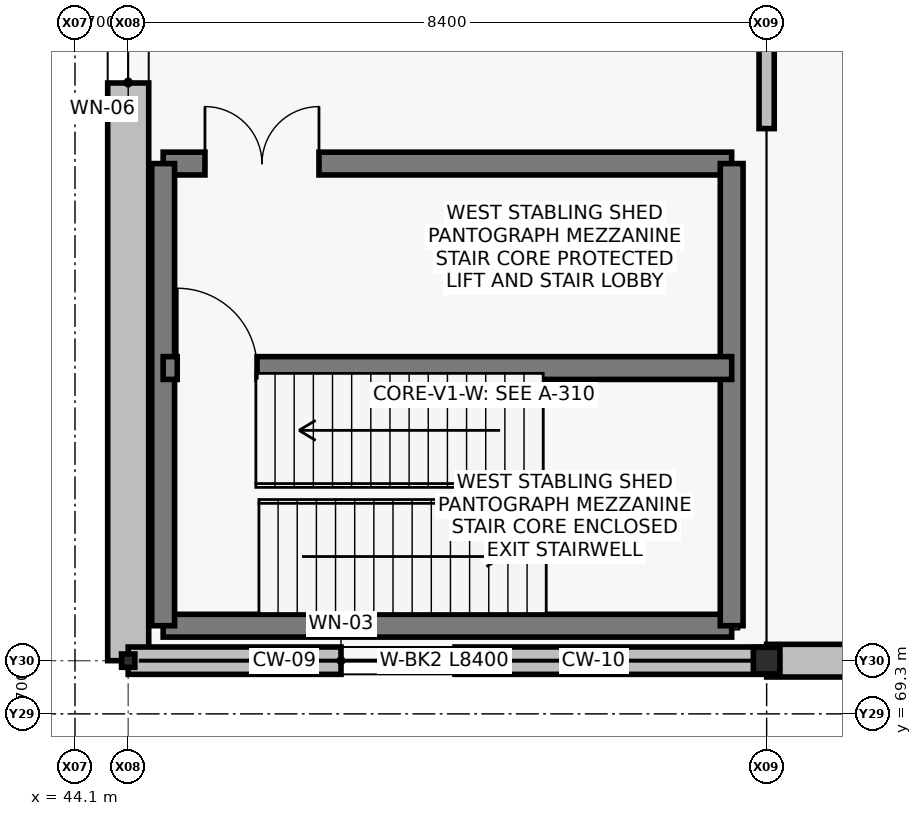
"""IFC4 building model, lengths in metres.
Left out: names, types, materials, properties, quantities, classifications, styles, units other than length and angle.
Written with IfcOpenShell. Run it as: python <this file> out.ifc"""

import sys

from ifc_helpers import new_model, si_unit, direction, frame, frame_2d, origin, origin_2d, place, context, subcontext, project, spatial, rectangle, i_section, extrude, element, fill, save


model = new_model("IFC4")
c1 = context("Model", 3, precision=1e-05, world=origin(), true_north=direction((0.0, 1.0)))
c2 = subcontext(c1, "Body", "Model", "MODEL_VIEW")
j1 = project(units=[si_unit("LENGTHUNIT", "METRE"), si_unit("PLANEANGLEUNIT", "RADIAN")], contexts=[c1])
p1 = place(None, origin())
s1 = spatial("IfcSite", under=j1, at=p1, CompositionType="ELEMENT")
p2 = place(p1, origin())
s2 = spatial("IfcBuilding", under=s1, at=p2, CompositionType="ELEMENT")
p3 = place(p2, origin())
s3 = spatial("IfcBuildingStorey", under=s2, at=p3, CompositionType="ELEMENT", Elevation=0.0)
p4 = place(p3, frame((44.8, 70.0, -0.35), z_axis=(0.0, 0.0, 1.0), x_axis=(1.0, 0.0, 0.0)))
e1 = element("IfcColumn", 1, at=p4, inside=s3, PredefinedType="COLUMN", context=c2, shape_type="SweptSolid", body=[
    extrude(i_section(OverallWidth=0.175, OverallDepth=0.175, WebThickness=0.007, FlangeThickness=0.011, at=origin_2d()), origin(), (0.0, 0.0, 1.0), 6.35),
])
p5 = place(p3, frame((53.2, 70.0, -0.35), z_axis=(0.0, 0.0, 1.0), x_axis=(1.0, 0.0, 0.0)))
e2 = element("IfcColumn", 2, at=p5, inside=s3, PredefinedType="COLUMN", context=c2, shape_type="SweptSolid", body=[
    extrude(i_section(OverallWidth=0.35, OverallDepth=0.35, WebThickness=0.012, FlangeThickness=0.019, at=origin_2d()), origin(), (0.0, 0.0, 1.0), 6.35),
])
p6 = place(p3, frame((44.8, 70.0, 0.0), z_axis=(0.0, 0.0, 1.0), x_axis=(0.0, 1.0, 0.0)))
e3 = element("IfcWall", 3, at=p6, inside=s3, PredefinedType="SOLIDWALL", context=c2, shape_type="SweptSolid", body=[
    extrude(rectangle(XDim=30.0, YDim=0.54, at=frame_2d((15.0, 0.0))), origin(), (0.0, 0.0, 1.0), 5.14),
])
p7 = place(p6, frame((7.6, 0.0, 1.1)))
e4 = element("IfcOpeningElement", 4, at=p7, cuts=e3, PredefinedType="OPENING", context=c2, shape_type="SweptSolid", body=[
    extrude(rectangle(XDim=1.8, YDim=2.1, at=frame_2d((0.9, 1.05))), frame((0.0, 0.28, 0.0), z_axis=(0.0, -1.0, 0.0), x_axis=(1.0, 0.0, 0.0)), (0.0, 0.0, 1.0), 0.56),
])
p8 = place(p6, frame((11.2, 0.0, 0.0)))
e5 = element("IfcOpeningElement", 5, at=p8, cuts=e3, PredefinedType="OPENING", context=c2, shape_type="SweptSolid", body=[
    extrude(rectangle(XDim=3.8, YDim=4.4, at=frame_2d((1.9, 2.2))), frame((0.0, 0.28, 0.0), z_axis=(0.0, -1.0, 0.0), x_axis=(1.0, 0.0, 0.0)), (0.0, 0.0, 1.0), 0.56),
])
p9 = place(p6, frame((15.4, 0.0, 0.0)))
e6 = element("IfcOpeningElement", 6, at=p9, cuts=e3, PredefinedType="OPENING", context=c2, shape_type="SweptSolid", body=[
    extrude(rectangle(XDim=3.8, YDim=4.4, at=frame_2d((1.9, 2.2))), frame((0.0, 0.28, 0.0), z_axis=(0.0, -1.0, 0.0), x_axis=(1.0, 0.0, 0.0)), (0.0, 0.0, 1.0), 0.56),
])
p10 = place(p6, frame((21.2, 0.0, 0.0)))
e7 = element("IfcOpeningElement", 7, at=p10, cuts=e3, PredefinedType="OPENING", context=c2, shape_type="SweptSolid", body=[
    extrude(rectangle(XDim=3.8, YDim=4.4, at=frame_2d((1.9, 2.2))), frame((0.0, 0.28, 0.0), z_axis=(0.0, -1.0, 0.0), x_axis=(1.0, 0.0, 0.0)), (0.0, 0.0, 1.0), 0.56),
])
p11 = place(p6, frame((25.4, 0.0, 0.0)))
e8 = element("IfcOpeningElement", 8, at=p11, cuts=e3, PredefinedType="OPENING", context=c2, shape_type="SweptSolid", body=[
    extrude(rectangle(XDim=3.8, YDim=4.4, at=frame_2d((1.9, 2.2))), frame((0.0, 0.28, 0.0), z_axis=(0.0, -1.0, 0.0), x_axis=(1.0, 0.0, 0.0)), (0.0, 0.0, 1.0), 0.56),
])
p12 = place(p3, frame((44.8, 70.0, 0.0), z_axis=(0.0, 0.0, 1.0), x_axis=(1.0, 0.0, 0.0)))
e9 = element("IfcWall", 9, at=p12, inside=s3, PredefinedType="SOLIDWALL", context=c2, shape_type="SweptSolid", body=[
    extrude(rectangle(XDim=8.4, YDim=0.36, at=frame_2d((4.2, 0.0))), origin(), (0.0, 0.0, 1.0), 3.2),
])
p13 = place(p12, frame((2.8, 0.0, 0.9)))
e10 = element("IfcOpeningElement", 10, at=p13, cuts=e9, PredefinedType="OPENING", context=c2, shape_type="SweptSolid", body=[
    extrude(rectangle(XDim=1.5, YDim=1.8, at=frame_2d((0.75, 0.9))), frame((0.0, 0.19, 0.0), z_axis=(0.0, -1.0, 0.0), x_axis=(1.0, 0.0, 0.0)), (0.0, 0.0, 1.0), 0.38),
])
p14 = place(p3, frame((53.2, 70.0, 0.0), z_axis=(0.0, 0.0, 1.0), x_axis=(1.0, 0.0, 0.0)))
e11 = element("IfcWall", 11, at=p14, inside=s3, PredefinedType="SOLIDWALL", context=c2, shape_type="SweptSolid", body=[
    extrude(rectangle(XDim=8.4, YDim=0.43, at=frame_2d((4.2, 0.0))), origin(), (0.0, 0.0, 1.0), 5.14),
])
p15 = place(p3, frame((45.26, 70.46, -0.35), z_axis=(0.0, 0.0, 1.0), x_axis=(1.0, 0.0, 0.0)))
e12 = element("IfcWall", 12, at=p15, inside=s3, PredefinedType="SHEAR", context=c2, shape_type="SweptSolid", body=[
    extrude(rectangle(XDim=7.48, YDim=0.3, at=frame_2d((3.74, 0.0))), origin(), (0.0, 0.0, 1.0), 6.07),
])
p16 = place(p3, frame((45.26, 76.54, -0.35), z_axis=(0.0, 0.0, 1.0), x_axis=(1.0, 0.0, 0.0)))
e13 = element("IfcWall", 13, at=p16, inside=s3, PredefinedType="SHEAR", context=c2, shape_type="SweptSolid", body=[
    extrude(rectangle(XDim=7.48, YDim=0.3, at=frame_2d((3.74, 0.0))), origin(), (0.0, 0.0, 1.0), 6.07),
])
p17 = place(p16, frame((0.55, 0.0, 0.35)))
e14 = element("IfcOpeningElement", 14, at=p17, cuts=e13, PredefinedType="OPENING", context=c2, shape_type="SweptSolid", body=[
    extrude(rectangle(XDim=1.5, YDim=2.2, at=frame_2d((0.75, 1.1))), frame((0.0, 0.16, 0.0), z_axis=(0.0, -1.0, 0.0), x_axis=(1.0, 0.0, 0.0)), (0.0, 0.0, 1.0), 0.32),
])
for number, where, z_axis, x_axis in (
    (15, (45.26, 70.46, -0.35), (0.0, 0.0, 1.0), (0.0, 1.0, 0.0)),
    (16, (52.74, 70.46, -0.35), (0.0, 0.0, 1.0), (0.0, 1.0, 0.0)),
):
    element("IfcWall", number, at=place(p3, frame(where, z_axis=z_axis, x_axis=x_axis)), inside=s3, PredefinedType="SHEAR", context=c2, shape_type="SweptSolid", body=[
        extrude(rectangle(XDim=6.08, YDim=0.3, at=frame_2d((3.04, 0.0))), origin(), (0.0, 0.0, 1.0), 6.07),
    ])
p18 = place(p3, frame((45.26, 73.85, -0.35), z_axis=(0.0, 0.0, 1.0), x_axis=(1.0, 0.0, 0.0)))
e17 = element("IfcWall", 17, at=p18, inside=s3, PredefinedType="SHEAR", context=c2, shape_type="SweptSolid", body=[
    extrude(rectangle(XDim=7.48, YDim=0.3, at=frame_2d((3.74, 0.0))), origin(), (0.0, 0.0, 1.0), 6.07),
])
p19 = place(p18, frame((0.185, 0.0, 0.35)))
e18 = element("IfcOpeningElement", 18, at=p19, cuts=e17, PredefinedType="OPENING", context=c2, shape_type="SweptSolid", body=[
    extrude(rectangle(XDim=1.05, YDim=2.15, at=frame_2d((0.525, 1.075))), frame((0.0, 0.16, 0.0), z_axis=(0.0, -1.0, 0.0), x_axis=(1.0, 0.0, 0.0)), (0.0, 0.0, 1.0), 0.32),
])
p20 = place(p3, frame((53.2, 77.0, 0.0), z_axis=(0.0, 0.0, 1.0), x_axis=(0.0, 1.0, 0.0)))
e19 = element("IfcWall", 19, at=p20, inside=s3, PredefinedType="PARTITIONING", context=c2, shape_type="SweptSolid", body=[
    extrude(rectangle(XDim=53.0, YDim=0.2, at=frame_2d((26.5, 0.0))), origin(), (0.0, 0.0, 1.0), 5.1),
])
p21 = place(p20, frame((7.0, 0.0, 0.0)))
e20 = element("IfcOpeningElement", 20, at=p21, cuts=e19, PredefinedType="OPENING", context=c2, shape_type="SweptSolid", body=[
    extrude(rectangle(XDim=1.4, YDim=2.2, at=frame_2d((0.7, 1.1))), frame((0.0, 0.11, 0.0), z_axis=(0.0, -1.0, 0.0), x_axis=(1.0, 0.0, 0.0)), (0.0, 0.0, 1.0), 0.22),
])
p22 = place(p20, frame((36.0, 0.0, 0.0)))
e21 = element("IfcOpeningElement", 21, at=p22, cuts=e19, PredefinedType="OPENING", context=c2, shape_type="SweptSolid", body=[
    extrude(rectangle(XDim=0.95, YDim=2.1, at=frame_2d((0.475, 1.05))), frame((0.0, 0.11, 0.0), z_axis=(0.0, -1.0, 0.0), x_axis=(1.0, 0.0, 0.0)), (0.0, 0.0, 1.0), 0.22),
])
p23 = place(p20, frame((46.0, 0.0, 0.0)))
e22 = element("IfcOpeningElement", 22, at=p23, cuts=e19, PredefinedType="OPENING", context=c2, shape_type="SweptSolid", body=[
    extrude(rectangle(XDim=1.0, YDim=2.1, at=frame_2d((0.5, 1.05))), frame((0.0, 0.11, 0.0), z_axis=(0.0, -1.0, 0.0), x_axis=(1.0, 0.0, 0.0)), (0.0, 0.0, 1.0), 0.22),
])
p24 = place(p7, origin())
e23 = element("IfcWindow", 23, at=p24, inside=s3, PartitioningType="SINGLE_PANEL", PredefinedType="WINDOW", context=c2, shape_type="SweptSolid", body=[
    extrude(rectangle(XDim=1.8, YDim=2.1, at=frame_2d((0.9, 1.05))), frame((0.0, 0.03, 0.0), z_axis=(0.0, -1.0, 0.0), x_axis=(1.0, 0.0, 0.0)), (0.0, 0.0, 1.0), 0.06),
])
fill(e4, e23)
p25 = place(p13, origin())
e24 = element("IfcWindow", 24, at=p25, inside=s3, PartitioningType="SINGLE_PANEL", PredefinedType="WINDOW", context=c2, shape_type="SweptSolid", body=[
    extrude(rectangle(XDim=1.5, YDim=1.8, at=frame_2d((0.75, 0.9))), frame((0.0, 0.03, 0.0), z_axis=(0.0, -1.0, 0.0), x_axis=(1.0, 0.0, 0.0)), (0.0, 0.0, 1.0), 0.06),
])
fill(e10, e24)
p26 = place(p19, origin())
e25 = element("IfcDoor", 25, at=p26, inside=s3, OperationType="SINGLE_SWING_LEFT", PredefinedType="DOOR", context=c2, shape_type="SweptSolid", body=[
    extrude(rectangle(XDim=1.05, YDim=2.15, at=frame_2d((0.525, 1.075))), frame((0.0, 0.025, 0.0), z_axis=(0.0, -1.0, 0.0), x_axis=(1.0, 0.0, 0.0)), (0.0, 0.0, 1.0), 0.05),
])
fill(e18, e25)
p27 = place(p17, origin())
e26 = element("IfcDoor", 26, at=p27, inside=s3, OperationType="DOUBLE_DOOR_SINGLE_SWING", PredefinedType="DOOR", context=c2, shape_type="SweptSolid", body=[
    extrude(rectangle(XDim=1.5, YDim=2.2, at=frame_2d((0.75, 1.1))), frame((0.0, 0.025, 0.0), z_axis=(0.0, -1.0, 0.0), x_axis=(1.0, 0.0, 0.0)), (0.0, 0.0, 1.0), 0.05),
])
fill(e14, e26)
save(model, sys.argv[1])
